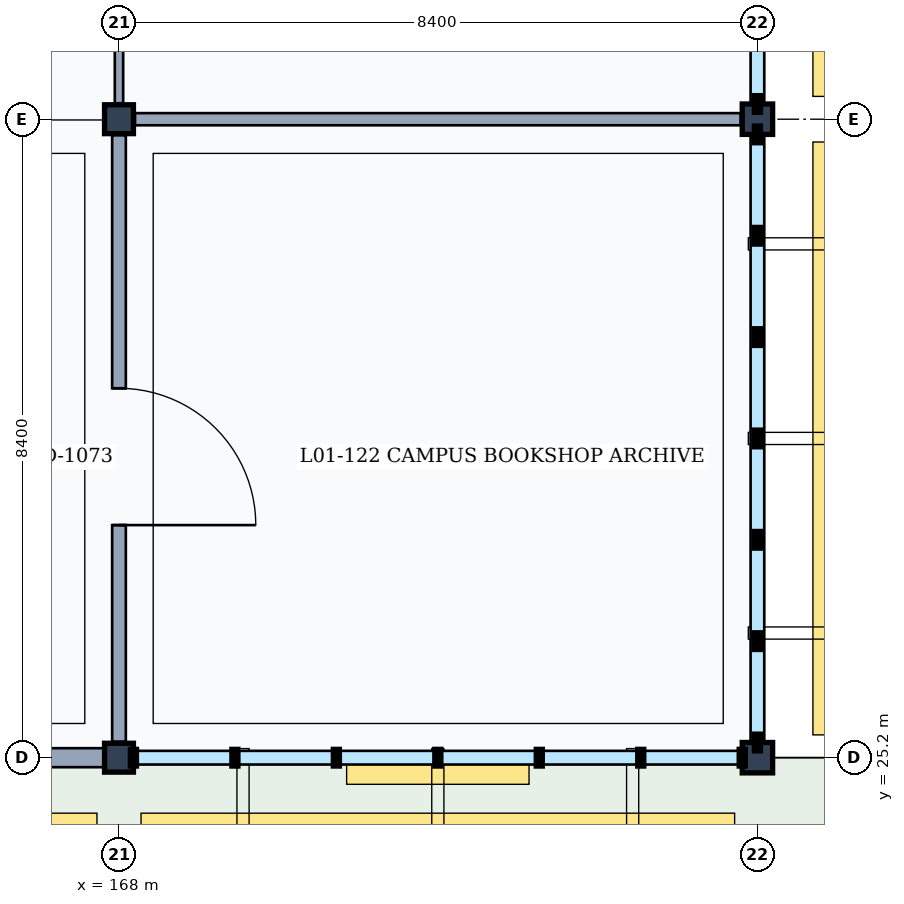
"""IFC4 building model, lengths in metres.
Left out: names, types, materials, properties, quantities, classifications, styles, units other than length and angle.
Written with IfcOpenShell. Run it as: python <this file> out.ifc"""

import sys

from ifc_helpers import new_model, si_unit, direction, frame, frame_2d, origin, origin_2d, place, context, subcontext, project, spatial, rectangle, extrude, element, fill, save


model = new_model("IFC4")
c1 = context("Model", 3, precision=1e-05, world=origin(), true_north=direction((0.0, 1.0)))
c2 = subcontext(c1, "Body", "Model", "MODEL_VIEW")
j1 = project(units=[si_unit("LENGTHUNIT", "METRE"), si_unit("PLANEANGLEUNIT", "RADIAN")], contexts=[c1])
p1 = place(None, origin())
s1 = spatial("IfcSite", under=j1, at=p1, CompositionType="ELEMENT")
p2 = place(p1, origin())
s2 = spatial("IfcBuilding", under=s1, at=p2, CompositionType="ELEMENT")
p3 = place(p2, frame((0.0, 0.0, 4.8)))
s3 = spatial("IfcBuildingStorey", under=s2, at=p3, CompositionType="ELEMENT", Elevation=4.8)
for number, where, z_axis, x_axis in (
    (1, (168.0, 25.2, 0.0), (0.0, 0.0, 1.0), (1.0, 0.0, 0.0)),
    (2, (168.0, 33.6, 0.0), (0.0, 0.0, 1.0), (1.0, 0.0, 0.0)),
):
    element("IfcColumn", number, at=place(p3, frame(where, z_axis=z_axis, x_axis=x_axis)), inside=s3, PredefinedType="COLUMN", context=c2, shape_type="SweptSolid", body=[
        extrude(rectangle(XDim=0.38, YDim=0.38, at=origin_2d()), origin(), (0.0, 0.0, 1.0), 4.8),
    ])
for number, where, z_axis, x_axis in (
    (3, (176.4, 25.2, 0.0), (0.0, 0.0, 1.0), (1.0, 0.0, 0.0)),
    (4, (176.4, 33.6, 0.0), (0.0, 0.0, 1.0), (1.0, 0.0, 0.0)),
):
    element("IfcColumn", number, at=place(p3, frame(where, z_axis=z_axis, x_axis=x_axis)), inside=s3, PredefinedType="COLUMN", context=c2, shape_type="SweptSolid", body=[
        extrude(rectangle(XDim=0.4, YDim=0.4, at=origin_2d()), origin(), (0.0, 0.0, 1.0), 4.8),
    ])
p4 = place(p3, frame((167.81, 25.2, 0.0), z_axis=(0.0, 0.0, 1.0), x_axis=(-1.0, 0.0, 0.0)))
e5 = element("IfcWall", 5, at=p4, inside=s3, PredefinedType="SOLIDWALL", context=c2, shape_type="SweptSolid", body=[
    extrude(rectangle(XDim=8.01, YDim=0.25, at=frame_2d((4.005, 0.0))), origin(), (0.0, 0.0, 1.0), 3.95),
])
p5 = place(p4, frame((3.005, 0.0, 0.9)))
e6 = element("IfcOpeningElement", 6, at=p5, cuts=e5, PredefinedType="OPENING", context=c2, shape_type="SweptSolid", body=[
    extrude(rectangle(XDim=2.0, YDim=1.7, at=frame_2d((1.0, 0.85))), frame((0.0, 0.135, 0.0), z_axis=(0.0, -1.0, 0.0), x_axis=(1.0, 0.0, 0.0)), (0.0, 0.0, 1.0), 0.27),
])
p6 = place(p3, frame((168.0, 25.41, 0.0), z_axis=(0.0, 0.0, 1.0), x_axis=(0.0, 1.0, 0.0)))
e7 = element("IfcWall", 7, at=p6, inside=s3, PredefinedType="PARTITIONING", context=c2, shape_type="SweptSolid", body=[
    extrude(rectangle(XDim=7.98, YDim=0.18, at=frame_2d((3.99, 0.0))), origin(), (0.0, 0.0, 1.0), 3.92),
])
p7 = place(p6, frame((2.85, 0.0, 0.0)))
e8 = element("IfcOpeningElement", 8, at=p7, cuts=e7, PredefinedType="OPENING", context=c2, shape_type="SweptSolid", body=[
    extrude(rectangle(XDim=1.8, YDim=2.3, at=frame_2d((0.9, 1.15))), frame((0.0, 0.1, 0.0), z_axis=(0.0, -1.0, 0.0), x_axis=(1.0, 0.0, 0.0)), (0.0, 0.0, 1.0), 0.2),
])
p8 = place(p3, frame((168.0, 33.81, 0.0), z_axis=(0.0, 0.0, 1.0), x_axis=(0.0, 1.0, 0.0)))
e9 = element("IfcWall", 9, at=p8, inside=s3, PredefinedType="PARTITIONING", context=c2, shape_type="SweptSolid", body=[
    extrude(rectangle(XDim=7.98, YDim=0.11, at=frame_2d((3.99, 0.0))), origin(), (0.0, 0.0, 1.0), 3.92),
])
p9 = place(p8, frame((3.15, 0.0, 0.0)))
e10 = element("IfcOpeningElement", 10, at=p9, cuts=e9, PredefinedType="OPENING", context=c2, shape_type="SweptSolid", body=[
    extrude(rectangle(XDim=1.2, YDim=2.2, at=frame_2d((0.6, 1.1))), frame((0.0, 0.065, 0.0), z_axis=(0.0, -1.0, 0.0), x_axis=(1.0, 0.0, 0.0)), (0.0, 0.0, 1.0), 0.13),
])
p10 = place(p3, frame((168.21, 33.6, 0.0), z_axis=(0.0, 0.0, 1.0), x_axis=(1.0, 0.0, 0.0)))
e11 = element("IfcWall", 11, at=p10, inside=s3, PredefinedType="PARTITIONING", context=c2, shape_type="SweptSolid", body=[
    extrude(rectangle(XDim=7.97, YDim=0.16, at=frame_2d((3.985, 0.0))), origin(), (0.0, 0.0, 1.0), 3.92),
])
p11 = place(p7, frame((1.8, 0.0, 0.0), z_axis=(0.0, 0.0, 1.0), x_axis=(-1.0, 0.0, 0.0)))
e12 = element("IfcDoor", 12, at=p11, inside=s3, OperationType="SINGLE_SWING_RIGHT", PredefinedType="DOOR", context=c2, shape_type="SweptSolid", body=[
    extrude(rectangle(XDim=1.8, YDim=2.3, at=frame_2d((0.9, 1.15))), frame((0.0, 0.025, 0.0), z_axis=(0.0, -1.0, 0.0), x_axis=(1.0, 0.0, 0.0)), (0.0, 0.0, 1.0), 0.05),
])
fill(e8, e12)
save(model, sys.argv[1])
